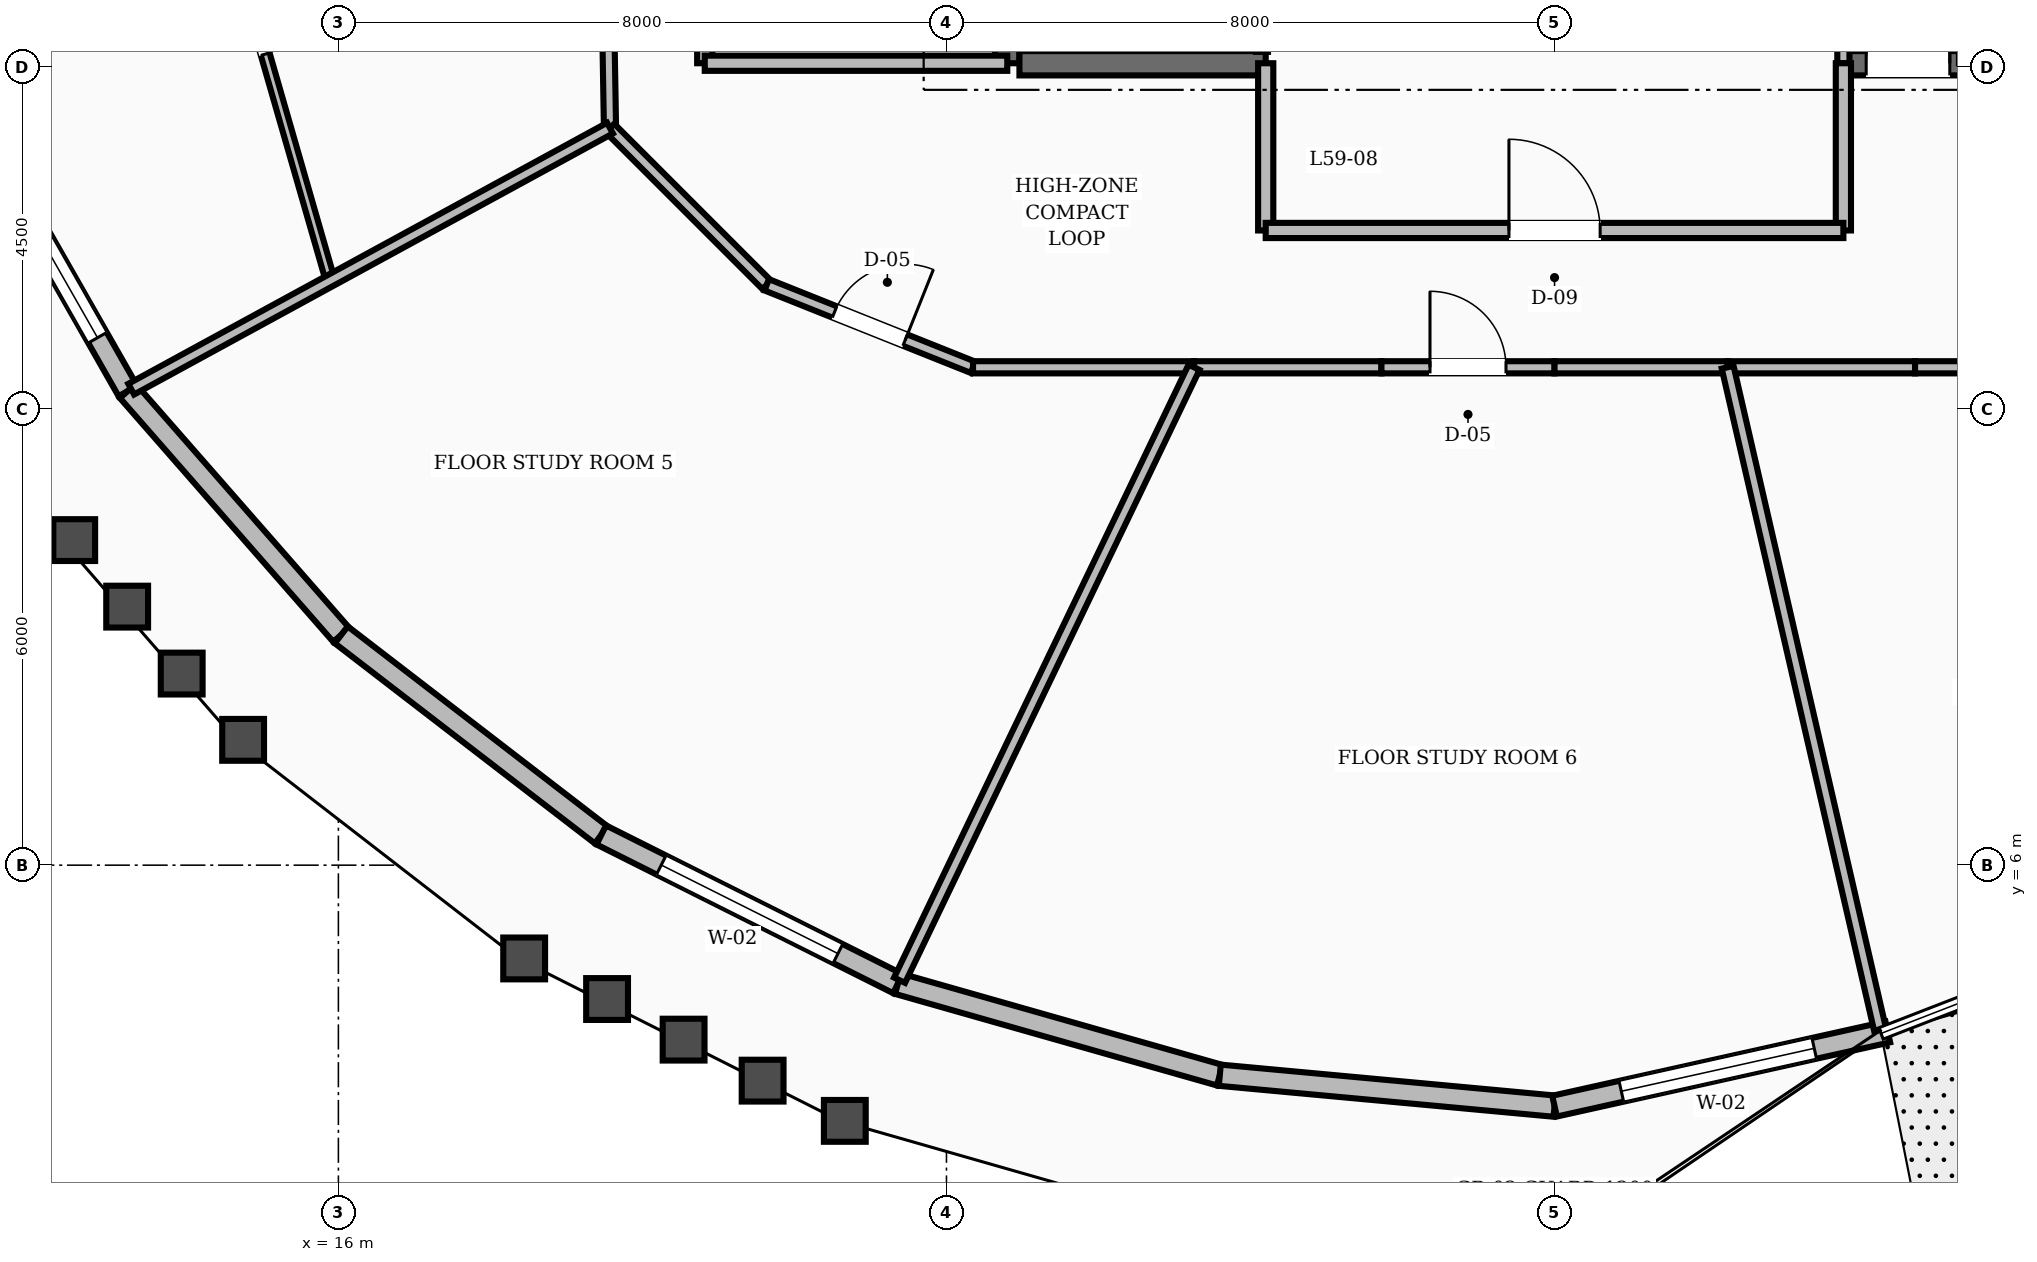
"""IFC4 building model, lengths in metres.
Left out: names, types, materials, properties, quantities, classifications, styles, units other than length and angle.
Written with IfcOpenShell. Run it as: python <this file> out.ifc"""

import sys

from ifc_helpers import new_model, si_unit, direction, frame, frame_2d, origin, place, context, subcontext, project, spatial, rectangle, extrude, element, fill, save


model = new_model("IFC4")
c1 = context("Model", 3, precision=1e-05, world=origin(), true_north=direction((0.0, 1.0)))
c2 = subcontext(c1, "Body", "Model", "MODEL_VIEW")
j1 = project(units=[si_unit("LENGTHUNIT", "METRE"), si_unit("PLANEANGLEUNIT", "RADIAN")], contexts=[c1])
p1 = place(None, origin())
s1 = spatial("IfcSite", under=j1, at=p1, CompositionType="ELEMENT")
p2 = place(p1, origin())
s2 = spatial("IfcBuilding", under=s1, at=p2, CompositionType="ELEMENT")
p3 = place(p2, frame((0.0, 0.0, 229.2)))
s3 = spatial("IfcBuildingStorey", under=s2, at=p3, CompositionType="ELEMENT", Elevation=229.2)
p4 = place(p3, frame((24.8, 16.55, 0.0), z_axis=(0.0, 0.0, 1.0), x_axis=(0.0, 1.0, 0.0)))
e1 = element("IfcWall", 1, at=p4, inside=s3, PredefinedType="SHEAR", context=c2, shape_type="SweptSolid", body=[
    extrude(rectangle(XDim=6.3, YDim=0.32, at=frame_2d((3.15, 0.0))), origin(), (0.0, 0.0, 1.0), 3.6),
])
p5 = place(p3, frame((24.96, 16.55, 0.0), z_axis=(0.0, 0.0, 1.0), x_axis=(1.0, 0.0, 0.0)))
e2 = element("IfcWall", 2, at=p5, inside=s3, PredefinedType="SHEAR", context=c2, shape_type="SweptSolid", body=[
    extrude(rectangle(XDim=3.24, YDim=0.32, at=frame_2d((1.62, 0.0))), origin(), (0.0, 0.0, 1.0), 3.6),
])
p6 = place(p3, frame((35.8, 16.55, 0.0), z_axis=(0.0, 0.0, 1.0), x_axis=(1.0, 0.0, 0.0)))
e3 = element("IfcWall", 3, at=p6, inside=s3, PredefinedType="SHEAR", context=c2, shape_type="SweptSolid", body=[
    extrude(rectangle(XDim=3.24, YDim=0.32, at=frame_2d((1.62, 0.0))), origin(), (0.0, 0.0, 1.0), 3.6),
])
p7 = place(p6, frame((0.3, 0.0, 0.0)))
e4 = element("IfcOpeningElement", 4, at=p7, cuts=e3, PredefinedType="OPENING", context=c2, shape_type="SweptSolid", body=[
    extrude(rectangle(XDim=1.1, YDim=2.1, at=frame_2d((0.55, 1.05))), frame((0.0, 0.17, 0.0), z_axis=(0.0, -1.0, 0.0), x_axis=(1.0, 0.0, 0.0)), (0.0, 0.0, 1.0), 0.34),
])
p8 = place(p3, frame((11.144, 15.898, 0.0), z_axis=(0.0, 0.0, 1.0), x_axis=(0.495183798622, -0.868788239782, 0.0)))
e5 = element("IfcWall", 5, at=p8, inside=s3, PredefinedType="STANDARD", context=c2, shape_type="SweptSolid", body=[
    extrude(rectangle(XDim=4.213, YDim=0.28, at=frame_2d((2.106, 0.0))), origin(), (0.0, 0.0, 1.0), 2.88),
])
p9 = place(p8, frame((0.806, 0.0, 0.8)))
e6 = element("IfcOpeningElement", 6, at=p9, cuts=e5, PredefinedType="OPENING", context=c2, shape_type="SweptSolid", body=[
    extrude(rectangle(XDim=2.6, YDim=1.65, at=frame_2d((1.3, 0.825))), frame((0.0, 0.15, 0.0), z_axis=(0.0, -1.0, 0.0), x_axis=(1.0, 0.0, 0.0)), (0.0, 0.0, 1.0), 0.3),
])
p10 = place(p3, frame((13.23, 12.238, 0.0), z_axis=(0.0, 0.0, 1.0), x_axis=(0.65855326106, -0.752534120387, 0.0)))
e7 = element("IfcWall", 7, at=p10, inside=s3, PredefinedType="STANDARD", context=c2, shape_type="SweptSolid", body=[
    extrude(rectangle(XDim=4.263, YDim=0.28, at=frame_2d((2.131, 0.0))), origin(), (0.0, 0.0, 1.0), 2.88),
])
p11 = place(p3, frame((16.038, 9.03, 0.0), z_axis=(0.0, 0.0, 1.0), x_axis=(0.792451546341, -0.609934870869, 0.0)))
e8 = element("IfcWall", 8, at=p11, inside=s3, PredefinedType="STANDARD", context=c2, shape_type="SweptSolid", body=[
    extrude(rectangle(XDim=4.317, YDim=0.28, at=frame_2d((2.158, 0.0))), origin(), (0.0, 0.0, 1.0), 2.88),
])
p12 = place(p3, frame((19.458, 6.397, 0.0), z_axis=(0.0, 0.0, 1.0), x_axis=(0.893979362311, -0.448108134005, 0.0)))
e9 = element("IfcWall", 9, at=p12, inside=s3, PredefinedType="STANDARD", context=c2, shape_type="SweptSolid", body=[
    extrude(rectangle(XDim=4.366, YDim=0.28, at=frame_2d((2.183, 0.0))), origin(), (0.0, 0.0, 1.0), 2.88),
])
p13 = place(p12, frame((0.883, 0.0, 0.8)))
e10 = element("IfcOpeningElement", 10, at=p13, cuts=e9, PredefinedType="OPENING", context=c2, shape_type="SweptSolid", body=[
    extrude(rectangle(XDim=2.6, YDim=1.65, at=frame_2d((1.3, 0.825))), frame((0.0, 0.15, 0.0), z_axis=(0.0, -1.0, 0.0), x_axis=(1.0, 0.0, 0.0)), (0.0, 0.0, 1.0), 0.3),
])
p14 = place(p3, frame((23.361, 4.441, 0.0), z_axis=(0.0, 0.0, 1.0), x_axis=(0.961841376219, -0.27360768811, 0.0)))
e11 = element("IfcWall", 11, at=p14, inside=s3, PredefinedType="STANDARD", context=c2, shape_type="SweptSolid", body=[
    extrude(rectangle(XDim=4.403, YDim=0.28, at=frame_2d((2.201, 0.0))), origin(), (0.0, 0.0, 1.0), 2.88),
])
p15 = place(p3, frame((27.596, 3.237, 0.0), z_axis=(0.0, 0.0, 1.0), x_axis=(0.995757268647, -0.092018812952, 0.0)))
e12 = element("IfcWall", 12, at=p15, inside=s3, PredefinedType="STANDARD", context=c2, shape_type="SweptSolid", body=[
    extrude(rectangle(XDim=4.423, YDim=0.28, at=frame_2d((2.211, 0.0))), origin(), (0.0, 0.0, 1.0), 2.88),
])
p16 = place(p3, frame((32.0, 2.83, 0.0), z_axis=(0.0, 0.0, 1.0), x_axis=(0.976105143188, 0.217298756193, 0.0)))
e13 = element("IfcWall", 13, at=p16, inside=s3, PredefinedType="STANDARD", context=c2, shape_type="SweptSolid", body=[
    extrude(rectangle(XDim=4.492, YDim=0.28, at=frame_2d((2.246, 0.0))), origin(), (0.0, 0.0, 1.0), 2.88),
])
p17 = place(p16, frame((0.9, 0.0, 0.8)))
e14 = element("IfcOpeningElement", 14, at=p17, cuts=e13, PredefinedType="OPENING", context=c2, shape_type="SweptSolid", body=[
    extrude(rectangle(XDim=2.6, YDim=1.65, at=frame_2d((1.3, 0.825))), frame((0.0, 0.15, 0.0), z_axis=(0.0, -1.0, 0.0), x_axis=(1.0, 0.0, 0.0)), (0.0, 0.0, 1.0), 0.3),
])
p18 = place(p3, frame((20.82, 16.55, 0.0), z_axis=(0.0, 0.0, 1.0), x_axis=(0.0, 1.0, 0.0)))
e15 = element("IfcWall", 15, at=p18, inside=s3, PredefinedType="SOLIDWALL", context=c2, shape_type="SweptSolid", body=[
    extrude(rectangle(XDim=2.73, YDim=0.2, at=frame_2d((1.365, 0.0))), origin(), (0.0, 0.0, 1.0), 2.87),
])
p19 = place(p18, frame((0.815, 0.0, 0.0)))
e16 = element("IfcOpeningElement", 16, at=p19, cuts=e15, PredefinedType="OPENING", context=c2, shape_type="SweptSolid", body=[
    extrude(rectangle(XDim=1.1, YDim=2.1, at=frame_2d((0.55, 1.05))), frame((0.0, 0.11, 0.0), z_axis=(0.0, -1.0, 0.0), x_axis=(1.0, 0.0, 0.0)), (0.0, 0.0, 1.0), 0.22),
])
p20 = place(p3, frame((20.82, 16.55, 0.0), z_axis=(0.0, 0.0, 1.0), x_axis=(1.0, 0.0, 0.0)))
e17 = element("IfcWall", 17, at=p20, inside=s3, PredefinedType="SOLIDWALL", context=c2, shape_type="SweptSolid", body=[
    extrude(rectangle(XDim=3.98, YDim=0.2, at=frame_2d((1.99, 0.0))), origin(), (0.0, 0.0, 1.0), 2.87),
])
p21 = place(p3, frame((35.8, 16.55, 0.0), z_axis=(0.0, 0.0, 1.0), x_axis=(0.0, 1.0, 0.0)))
e18 = element("IfcWall", 18, at=p21, inside=s3, PredefinedType="SOLIDWALL", context=c2, shape_type="SweptSolid", body=[
    extrude(rectangle(XDim=3.3, YDim=0.16, at=frame_2d((1.65, 0.0))), origin(), (0.0, 0.0, 1.0), 2.87),
])
for number, where, z_axis, x_axis in (
    (19, (28.2, 14.35, 0.0), (0.0, 0.0, 1.0), (0.0, 1.0, 0.0)),
    (20, (35.8, 14.35, 0.0), (0.0, 0.0, 1.0), (0.0, 1.0, 0.0)),
):
    element("IfcWall", number, at=place(p3, frame(where, z_axis=z_axis, x_axis=x_axis)), inside=s3, PredefinedType="SOLIDWALL", context=c2, shape_type="SweptSolid", body=[
        extrude(rectangle(XDim=2.2, YDim=0.2, at=frame_2d((1.1, 0.0))), origin(), (0.0, 0.0, 1.0), 2.87),
    ])
p22 = place(p3, frame((28.2, 14.35, 0.0), z_axis=(0.0, 0.0, 1.0), x_axis=(1.0, 0.0, 0.0)))
e21 = element("IfcWall", 21, at=p22, inside=s3, PredefinedType="SOLIDWALL", context=c2, shape_type="SweptSolid", body=[
    extrude(rectangle(XDim=7.6, YDim=0.2, at=frame_2d((3.8, 0.0))), origin(), (0.0, 0.0, 1.0), 2.87),
])
p23 = place(p22, frame((3.2, 0.0, 0.0)))
e22 = element("IfcOpeningElement", 22, at=p23, cuts=e21, PredefinedType="OPENING", context=c2, shape_type="SweptSolid", body=[
    extrude(rectangle(XDim=1.2, YDim=2.1, at=frame_2d((0.6, 1.05))), frame((0.0, 0.11, 0.0), z_axis=(0.0, -1.0, 0.0), x_axis=(1.0, 0.0, 0.0)), (0.0, 0.0, 1.0), 0.22),
])
p24 = place(p3, frame((19.52, 18.831, 0.0), z_axis=(0.0, 0.0, 1.0), x_axis=(0.016981035134, -0.999855811828, 0.0)))
e23 = element("IfcWall", 23, at=p24, inside=s3, PredefinedType="SOLIDWALL", context=c2, shape_type="SweptSolid", body=[
    extrude(rectangle(XDim=3.134, YDim=0.16, at=frame_2d((1.567, 0.0))), origin(), (0.0, 0.0, 1.0), 2.87),
])
p25 = place(p3, frame((19.573, 15.697, 0.0), z_axis=(0.0, 0.0, 1.0), x_axis=(0.707106781187, -0.707106781187, 0.0)))
e24 = element("IfcWall", 24, at=p25, inside=s3, PredefinedType="SOLIDWALL", context=c2, shape_type="SweptSolid", body=[
    extrude(rectangle(XDim=2.916, YDim=0.16, at=frame_2d((1.458, 0.0))), origin(), (0.0, 0.0, 1.0), 2.87),
])
p26 = place(p3, frame((21.635, 13.635, 0.0), z_axis=(0.0, 0.0, 1.0), x_axis=(0.92856882165, -0.371160266542, 0.0)))
e25 = element("IfcWall", 25, at=p26, inside=s3, PredefinedType="SOLIDWALL", context=c2, shape_type="SweptSolid", body=[
    extrude(rectangle(XDim=2.923, YDim=0.16, at=frame_2d((1.461, 0.0))), origin(), (0.0, 0.0, 1.0), 2.87),
])
p27 = place(p26, frame((0.962, 0.0, 0.0)))
e26 = element("IfcOpeningElement", 26, at=p27, cuts=e25, PredefinedType="OPENING", context=c2, shape_type="SweptSolid", body=[
    extrude(rectangle(XDim=1.0, YDim=2.1, at=frame_2d((0.5, 1.05))), frame((0.0, 0.09, 0.0), z_axis=(0.0, -1.0, 0.0), x_axis=(1.0, 0.0, 0.0)), (0.0, 0.0, 1.0), 0.18),
])
p28 = place(p3, frame((24.349, 12.55, 0.0), z_axis=(0.0, 0.0, 1.0), x_axis=(1.0, 0.0, 0.0)))
e27 = element("IfcWall", 27, at=p28, inside=s3, PredefinedType="SOLIDWALL", context=c2, shape_type="SweptSolid", body=[
    extrude(rectangle(XDim=2.908, YDim=0.16, at=frame_2d((1.454, 0.0))), origin(), (0.0, 0.0, 1.0), 2.87),
])
p29 = place(p3, frame((27.257, 12.55, 0.0), z_axis=(0.0, 0.0, 1.0), x_axis=(1.0, 0.0, 0.0)))
e28 = element("IfcWall", 28, at=p29, inside=s3, PredefinedType="SOLIDWALL", context=c2, shape_type="SweptSolid", body=[
    extrude(rectangle(XDim=2.465, YDim=0.16, at=frame_2d((1.232, 0.0))), origin(), (0.0, 0.0, 1.0), 2.87),
])
p30 = place(p3, frame((29.722, 12.55, 0.0), z_axis=(0.0, 0.0, 1.0), x_axis=(1.0, 0.0, 0.0)))
e29 = element("IfcWall", 29, at=p30, inside=s3, PredefinedType="SOLIDWALL", context=c2, shape_type="SweptSolid", body=[
    extrude(rectangle(XDim=2.278, YDim=0.16, at=frame_2d((1.139, 0.0))), origin(), (0.0, 0.0, 1.0), 2.87),
])
p31 = place(p30, frame((0.639, 0.0, 0.0)))
e30 = element("IfcOpeningElement", 30, at=p31, cuts=e29, PredefinedType="OPENING", context=c2, shape_type="SweptSolid", body=[
    extrude(rectangle(XDim=1.0, YDim=2.1, at=frame_2d((0.5, 1.05))), frame((0.0, 0.09, 0.0), z_axis=(0.0, -1.0, 0.0), x_axis=(1.0, 0.0, 0.0)), (0.0, 0.0, 1.0), 0.18),
])
p32 = place(p3, frame((32.0, 12.55, 0.0), z_axis=(0.0, 0.0, 1.0), x_axis=(1.0, 0.0, 0.0)))
e31 = element("IfcWall", 31, at=p32, inside=s3, PredefinedType="SOLIDWALL", context=c2, shape_type="SweptSolid", body=[
    extrude(rectangle(XDim=2.278, YDim=0.16, at=frame_2d((1.139, 0.0))), origin(), (0.0, 0.0, 1.0), 2.87),
])
p33 = place(p3, frame((34.278, 12.55, 0.0), z_axis=(0.0, 0.0, 1.0), x_axis=(1.0, 0.0, 0.0)))
e32 = element("IfcWall", 32, at=p33, inside=s3, PredefinedType="SOLIDWALL", context=c2, shape_type="SweptSolid", body=[
    extrude(rectangle(XDim=2.465, YDim=0.16, at=frame_2d((1.232, 0.0))), origin(), (0.0, 0.0, 1.0), 2.87),
])
p34 = place(p3, frame((36.743, 12.55, 0.0), z_axis=(0.0, 0.0, 1.0), x_axis=(1.0, 0.0, 0.0)))
e33 = element("IfcWall", 33, at=p34, inside=s3, PredefinedType="SOLIDWALL", context=c2, shape_type="SweptSolid", body=[
    extrude(rectangle(XDim=2.908, YDim=0.16, at=frame_2d((1.454, 0.0))), origin(), (0.0, 0.0, 1.0), 2.87),
])
p35 = place(p34, frame((0.954, 0.0, 0.0)))
e34 = element("IfcOpeningElement", 34, at=p35, cuts=e33, PredefinedType="OPENING", context=c2, shape_type="SweptSolid", body=[
    extrude(rectangle(XDim=1.0, YDim=2.1, at=frame_2d((0.5, 1.05))), frame((0.0, 0.09, 0.0), z_axis=(0.0, -1.0, 0.0), x_axis=(1.0, 0.0, 0.0)), (0.0, 0.0, 1.0), 0.18),
])
p36 = place(p3, frame((13.917, 20.562, 0.0), z_axis=(0.0, 0.0, 1.0), x_axis=(0.276547112257, -0.961000361448, 0.0)))
e35 = element("IfcWall", 35, at=p36, inside=s3, PredefinedType="PARTITIONING", context=c2, shape_type="SweptSolid", body=[
    extrude(rectangle(XDim=7.15, YDim=0.12, at=frame_2d((3.575, 0.0))), origin(), (0.0, 0.0, 1.0), 2.87),
])
p37 = place(p36, frame((3.1, 0.0, 0.0)))
e36 = element("IfcOpeningElement", 36, at=p37, cuts=e35, PredefinedType="OPENING", context=c2, shape_type="SweptSolid", body=[
    extrude(rectangle(XDim=0.95, YDim=2.1, at=frame_2d((0.475, 1.05))), frame((0.0, 0.07, 0.0), z_axis=(0.0, -1.0, 0.0), x_axis=(1.0, 0.0, 0.0)), (0.0, 0.0, 1.0), 0.14),
])
p38 = place(p3, frame((19.573, 15.697, 0.0), z_axis=(0.0, 0.0, 1.0), x_axis=(-0.877963189824, -0.478728145521, 0.0)))
e37 = element("IfcWall", 37, at=p38, inside=s3, PredefinedType="SOLIDWALL", context=c2, shape_type="SweptSolid", body=[
    extrude(rectangle(XDim=7.174, YDim=0.16, at=frame_2d((3.587, 0.0))), origin(), (0.0, 0.0, 1.0), 2.87),
])
p39 = place(p3, frame((27.257, 12.55, 0.0), z_axis=(0.0, 0.0, 1.0), x_axis=(-0.433065509255, -0.901362449126, 0.0)))
e38 = element("IfcWall", 38, at=p39, inside=s3, PredefinedType="SOLIDWALL", context=c2, shape_type="SweptSolid", body=[
    extrude(rectangle(XDim=8.946, YDim=0.16, at=frame_2d((4.473, 0.0))), origin(), (0.0, 0.0, 1.0), 2.87),
])
p40 = place(p3, frame((34.278, 12.55, 0.0), z_axis=(0.0, 0.0, 1.0), x_axis=(0.224283288053, -0.974523989802, 0.0)))
e39 = element("IfcWall", 39, at=p40, inside=s3, PredefinedType="SOLIDWALL", context=c2, shape_type="SweptSolid", body=[
    extrude(rectangle(XDim=8.943, YDim=0.16, at=frame_2d((4.472, 0.0))), origin(), (0.0, 0.0, 1.0), 2.87),
])
p41 = place(p9, origin())
e40 = element("IfcWindow", 40, at=p41, inside=s3, PartitioningType="SINGLE_PANEL", PredefinedType="WINDOW", context=c2, shape_type="SweptSolid", body=[
    extrude(rectangle(XDim=2.6, YDim=1.65, at=frame_2d((1.3, 0.825))), frame((0.0, 0.03, 0.0), z_axis=(0.0, -1.0, 0.0), x_axis=(1.0, 0.0, 0.0)), (0.0, 0.0, 1.0), 0.06),
])
fill(e6, e40)
p42 = place(p13, origin())
e41 = element("IfcWindow", 41, at=p42, inside=s3, PartitioningType="SINGLE_PANEL", PredefinedType="WINDOW", context=c2, shape_type="SweptSolid", body=[
    extrude(rectangle(XDim=2.6, YDim=1.65, at=frame_2d((1.3, 0.825))), frame((0.0, 0.03, 0.0), z_axis=(0.0, -1.0, 0.0), x_axis=(1.0, 0.0, 0.0)), (0.0, 0.0, 1.0), 0.06),
])
fill(e10, e41)
p43 = place(p17, origin())
e42 = element("IfcWindow", 42, at=p43, inside=s3, PartitioningType="SINGLE_PANEL", PredefinedType="WINDOW", context=c2, shape_type="SweptSolid", body=[
    extrude(rectangle(XDim=2.6, YDim=1.65, at=frame_2d((1.3, 0.825))), frame((0.0, 0.03, 0.0), z_axis=(0.0, -1.0, 0.0), x_axis=(1.0, 0.0, 0.0)), (0.0, 0.0, 1.0), 0.06),
])
fill(e14, e42)
p44 = place(p7, origin())
e43 = element("IfcDoor", 43, at=p44, inside=s3, OperationType="SINGLE_SWING_RIGHT", PredefinedType="DOOR", context=c2, shape_type="SweptSolid", body=[
    extrude(rectangle(XDim=1.1, YDim=2.1, at=frame_2d((0.55, 1.05))), frame((0.0, 0.025, 0.0), z_axis=(0.0, -1.0, 0.0), x_axis=(1.0, 0.0, 0.0)), (0.0, 0.0, 1.0), 0.05),
])
fill(e4, e43)
p45 = place(p23, origin())
e44 = element("IfcDoor", 44, at=p45, inside=s3, OperationType="SINGLE_SWING_LEFT", PredefinedType="DOOR", context=c2, shape_type="SweptSolid", body=[
    extrude(rectangle(XDim=1.2, YDim=2.1, at=frame_2d((0.6, 1.05))), frame((0.0, 0.025, 0.0), z_axis=(0.0, -1.0, 0.0), x_axis=(1.0, 0.0, 0.0)), (0.0, 0.0, 1.0), 0.05),
])
fill(e22, e44)
p46 = place(p37, origin())
e45 = element("IfcDoor", 45, at=p46, inside=s3, OperationType="SINGLE_SWING_LEFT", PredefinedType="DOOR", context=c2, shape_type="SweptSolid", body=[
    extrude(rectangle(XDim=0.95, YDim=2.1, at=frame_2d((0.475, 1.05))), frame((0.0, 0.025, 0.0), z_axis=(0.0, -1.0, 0.0), x_axis=(1.0, 0.0, 0.0)), (0.0, 0.0, 1.0), 0.05),
])
fill(e36, e45)
p47 = place(p27, origin())
e46 = element("IfcDoor", 46, at=p47, inside=s3, OperationType="SINGLE_SWING_RIGHT", PredefinedType="DOOR", context=c2, shape_type="SweptSolid", body=[
    extrude(rectangle(XDim=1.0, YDim=2.1, at=frame_2d((0.5, 1.05))), frame((0.0, 0.025, 0.0), z_axis=(0.0, -1.0, 0.0), x_axis=(1.0, 0.0, 0.0)), (0.0, 0.0, 1.0), 0.05),
])
fill(e26, e46)
p48 = place(p31, origin())
e47 = element("IfcDoor", 47, at=p48, inside=s3, OperationType="SINGLE_SWING_LEFT", PredefinedType="DOOR", context=c2, shape_type="SweptSolid", body=[
    extrude(rectangle(XDim=1.0, YDim=2.1, at=frame_2d((0.5, 1.05))), frame((0.0, 0.025, 0.0), z_axis=(0.0, -1.0, 0.0), x_axis=(1.0, 0.0, 0.0)), (0.0, 0.0, 1.0), 0.05),
])
fill(e30, e47)
save(model, sys.argv[1])
